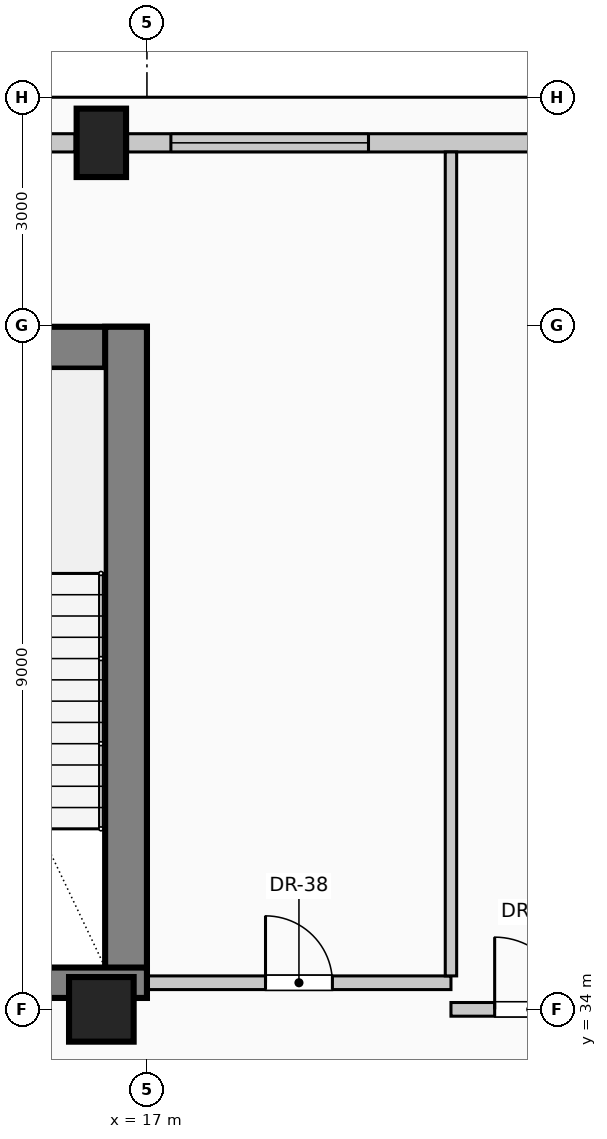
"""IFC4 building model, lengths in metres.
Left out: names, types, materials, properties, quantities, classifications, styles, units other than length and angle.
Written with IfcOpenShell. Run it as: python <this file> out.ifc"""

import sys

from ifc_helpers import new_model, si_unit, direction, frame, frame_2d, origin, origin_2d, place, context, subcontext, project, spatial, rectangle, circle, extrude, element, fill, save


model = new_model("IFC4")
c1 = context("Model", 3, precision=1e-05, world=origin(), true_north=direction((0.0, 1.0)))
c2 = subcontext(c1, "Body", "Model", "MODEL_VIEW")
j1 = project(units=[si_unit("LENGTHUNIT", "METRE"), si_unit("PLANEANGLEUNIT", "RADIAN")], contexts=[c1])
p1 = place(None, origin())
s1 = spatial("IfcSite", under=j1, at=p1, CompositionType="ELEMENT")
p2 = place(p1, origin())
s2 = spatial("IfcBuilding", under=s1, at=p2, CompositionType="ELEMENT")
p3 = place(p2, frame((0.0, 0.0, 313.0)))
s3 = spatial("IfcBuildingStorey", under=s2, at=p3, CompositionType="ELEMENT", Elevation=313.0)
p4 = place(p3, frame((3.0, 42.705, 0.0), z_axis=(0.0, 0.0, 1.0), x_axis=(1.0, 0.0, 0.0)))
e1 = element("IfcWall", 1, at=p4, inside=s3, PredefinedType="SHEAR", context=c2, shape_type="SweptSolid", body=[
    extrude(rectangle(XDim=14.0, YDim=0.55, at=frame_2d((7.0, 0.0))), origin(), (0.0, 0.0, 1.0), 4.8),
])
p5 = place(p3, frame((16.725, 34.15, 0.0), z_axis=(0.0, 0.0, 1.0), x_axis=(0.0, 1.0, 0.0)))
e2 = element("IfcWall", 2, at=p5, inside=s3, PredefinedType="SHEAR", context=c2, shape_type="SweptSolid", body=[
    extrude(rectangle(XDim=8.83, YDim=0.55, at=frame_2d((4.415, 0.0))), origin(), (0.0, 0.0, 1.0), 4.8),
])
p6 = place(p3, frame((12.29, 34.35, 0.0), z_axis=(0.0, 0.0, 1.0), x_axis=(1.0, 0.0, 0.0)))
e3 = element("IfcWall", 3, at=p6, inside=s3, PredefinedType="SHEAR", context=c2, shape_type="SweptSolid", body=[
    extrude(rectangle(XDim=4.71, YDim=0.4, at=frame_2d((2.355, 0.0))), origin(), (0.0, 0.0, 1.0), 4.8),
])
p7 = place(p6, frame((1.4, 0.0, 0.0)))
e4 = element("IfcOpeningElement", 4, at=p7, cuts=e3, PredefinedType="OPENING", context=c2, shape_type="SweptSolid", body=[
    extrude(rectangle(XDim=1.15, YDim=2.2, at=frame_2d((0.575, 1.1))), frame((0.0, 0.21, 0.0), z_axis=(0.0, -1.0, 0.0), x_axis=(1.0, 0.0, 0.0)), (0.0, 0.0, 1.0), 0.42),
])
p8 = place(p3, frame((16.4, 45.4, 0.0), z_axis=(0.0, 0.0, 1.0), x_axis=(1.0, 0.0, 0.0)))
e5 = element("IfcColumn", 5, at=p8, inside=s3, PredefinedType="COLUMN", context=c2, shape_type="SweptSolid", body=[
    extrude(rectangle(XDim=0.65, YDim=0.9, at=origin_2d()), origin(), (0.0, 0.0, 1.0), 4.8),
])
p9 = place(p3, frame((16.4, 34.0, 0.0), z_axis=(0.0, 0.0, 1.0), x_axis=(1.0, 0.0, 0.0)))
e6 = element("IfcColumn", 6, at=p9, inside=s3, PredefinedType="COLUMN", context=c2, shape_type="SweptSolid", body=[
    extrude(circle(Radius=0.425, at=origin_2d()), origin(), (0.0, 0.0, 1.0), 4.8),
])
p10 = place(p3, frame((14.345, 45.4, 0.0), z_axis=(0.0, 0.0, 1.0), x_axis=(1.0, 0.0, 0.0)))
e7 = element("IfcWall", 7, at=p10, inside=s3, PredefinedType="SOLIDWALL", context=c2, shape_type="SweptSolid", body=[
    extrude(rectangle(XDim=1.71, YDim=0.24, at=frame_2d((0.855, 0.0))), origin(), (0.0, 0.0, 1.0), 3.71),
])
p11 = place(p3, frame((16.745, 45.4, 0.0), z_axis=(0.0, 0.0, 1.0), x_axis=(1.0, 0.0, 0.0)))
e8 = element("IfcWall", 8, at=p11, inside=s3, PredefinedType="SOLIDWALL", context=c2, shape_type="SweptSolid", body=[
    extrude(rectangle(XDim=6.91, YDim=0.24, at=frame_2d((3.455, 0.0))), origin(), (0.0, 0.0, 1.0), 2.86),
])
p12 = place(p11, frame((0.57, 0.0, 0.35)))
e9 = element("IfcOpeningElement", 9, at=p12, cuts=e8, PredefinedType="OPENING", context=c2, shape_type="SweptSolid", body=[
    extrude(rectangle(XDim=2.6, YDim=2.4, at=frame_2d((1.3, 1.2))), frame((0.0, 0.13, 0.0), z_axis=(0.0, -1.0, 0.0), x_axis=(1.0, 0.0, 0.0)), (0.0, 0.0, 1.0), 0.26),
])
p13 = place(p3, frame((21.0, 34.0, 0.0), z_axis=(0.0, 0.0, 1.0), x_axis=(1.0, 0.0, 0.0)))
e10 = element("IfcWall", 10, at=p13, inside=s3, PredefinedType="PARTITIONING", context=c2, shape_type="SweptSolid", body=[
    extrude(rectangle(XDim=2.1, YDim=0.18, at=frame_2d((1.05, 0.0))), origin(), (0.0, 0.0, 1.0), 2.855),
])
p14 = place(p13, frame((0.575, 0.0, 0.0)))
e11 = element("IfcOpeningElement", 11, at=p14, cuts=e10, PredefinedType="OPENING", context=c2, shape_type="SweptSolid", body=[
    extrude(rectangle(XDim=0.95, YDim=2.15, at=frame_2d((0.475, 1.075))), frame((0.0, 0.1, 0.0), z_axis=(0.0, -1.0, 0.0), x_axis=(1.0, 0.0, 0.0)), (0.0, 0.0, 1.0), 0.2),
])
p15 = place(p3, frame((17.0, 34.35, 0.0), z_axis=(0.0, 0.0, 1.0), x_axis=(1.0, 0.0, 0.0)))
e12 = element("IfcWall", 12, at=p15, inside=s3, PredefinedType="PARTITIONING", context=c2, shape_type="SweptSolid", body=[
    extrude(rectangle(XDim=4.0, YDim=0.18, at=frame_2d((2.0, 0.0))), origin(), (0.0, 0.0, 1.0), 2.855),
])
p16 = place(p15, frame((1.56, 0.0, 0.0)))
e13 = element("IfcOpeningElement", 13, at=p16, cuts=e12, PredefinedType="OPENING", context=c2, shape_type="SweptSolid", body=[
    extrude(rectangle(XDim=0.88, YDim=2.1, at=frame_2d((0.44, 1.05))), frame((0.0, 0.1, 0.0), z_axis=(0.0, -1.0, 0.0), x_axis=(1.0, 0.0, 0.0)), (0.0, 0.0, 1.0), 0.2),
])
p17 = place(p3, frame((21.0, 34.44, 0.0), z_axis=(0.0, 0.0, 1.0), x_axis=(0.0, 1.0, 0.0)))
e14 = element("IfcWall", 14, at=p17, inside=s3, PredefinedType="PARTITIONING", context=c2, shape_type="SweptSolid", body=[
    extrude(rectangle(XDim=10.84, YDim=0.15, at=frame_2d((5.42, 0.0))), origin(), (0.0, 0.0, 1.0), 4.46),
])
p18 = place(p12, origin())
e15 = element("IfcWindow", 15, at=p18, inside=s3, PartitioningType="SINGLE_PANEL", PredefinedType="WINDOW", context=c2, shape_type="SweptSolid", body=[
    extrude(rectangle(XDim=2.6, YDim=2.4, at=frame_2d((1.3, 1.2))), frame((0.0, 0.03, 0.0), z_axis=(0.0, -1.0, 0.0), x_axis=(1.0, 0.0, 0.0)), (0.0, 0.0, 1.0), 0.06),
])
fill(e9, e15)
p19 = place(p14, origin())
e16 = element("IfcDoor", 16, at=p19, inside=s3, OperationType="SINGLE_SWING_LEFT", PredefinedType="DOOR", context=c2, shape_type="SweptSolid", body=[
    extrude(rectangle(XDim=0.95, YDim=2.15, at=frame_2d((0.475, 1.075))), frame((0.0, 0.025, 0.0), z_axis=(0.0, -1.0, 0.0), x_axis=(1.0, 0.0, 0.0)), (0.0, 0.0, 1.0), 0.05),
])
fill(e11, e16)
p20 = place(p16, origin())
e17 = element("IfcDoor", 17, at=p20, inside=s3, OperationType="SINGLE_SWING_LEFT", PredefinedType="DOOR", context=c2, shape_type="SweptSolid", body=[
    extrude(rectangle(XDim=0.88, YDim=2.1, at=frame_2d((0.44, 1.05))), frame((0.0, 0.025, 0.0), z_axis=(0.0, -1.0, 0.0), x_axis=(1.0, 0.0, 0.0)), (0.0, 0.0, 1.0), 0.05),
])
fill(e13, e17)
save(model, sys.argv[1])
